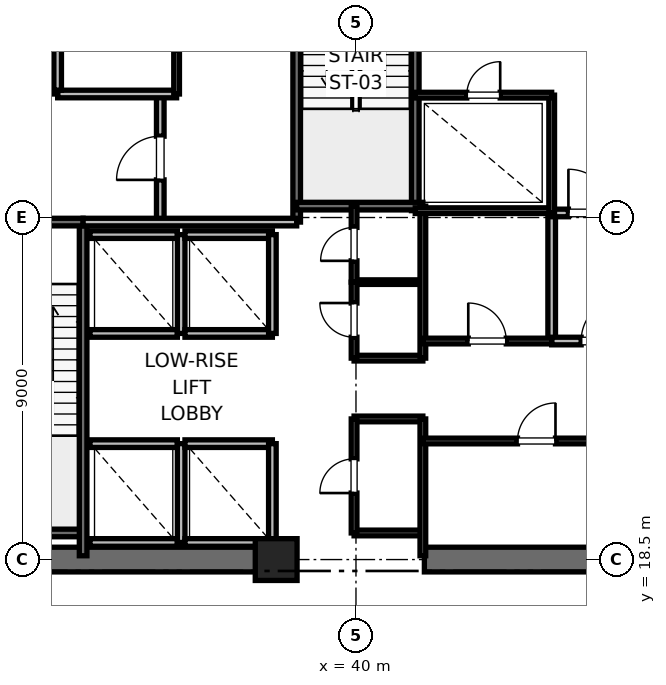
"""IFC4 building model, lengths in metres.
Left out: names, types, materials, properties, quantities, classifications, styles, units other than length and angle.
Written with IfcOpenShell. Run it as: python <this file> out.ifc"""

import sys

from ifc_helpers import new_model, si_unit, direction, frame, frame_2d, origin, origin_2d, place, context, subcontext, project, spatial, rectangle, extrude, element, fill, save


model = new_model("IFC4")
c1 = context("Model", 3, precision=1e-05, world=origin(), true_north=direction((0.0, 1.0)))
c2 = subcontext(c1, "Body", "Model", "MODEL_VIEW")
j1 = project(units=[si_unit("LENGTHUNIT", "METRE"), si_unit("PLANEANGLEUNIT", "RADIAN")], contexts=[c1])
p1 = place(None, origin())
s1 = spatial("IfcSite", under=j1, at=p1, CompositionType="ELEMENT")
p2 = place(p1, origin())
s2 = spatial("IfcBuilding", under=s1, at=p2, CompositionType="ELEMENT")
p3 = place(p2, frame((0.0, 0.0, 16.4)))
s3 = spatial("IfcBuildingStorey", under=s2, at=p3, CompositionType="ELEMENT", Elevation=16.4)
p4 = place(p3, frame((37.9, 18.5, 0.0), z_axis=(0.0, 0.0, 1.0), x_axis=(1.0, 0.0, 0.0)))
e1 = element("IfcColumn", 1, at=p4, inside=s3, PredefinedType="PILASTER", context=c2, shape_type="SweptSolid", body=[
    extrude(rectangle(XDim=1.1, YDim=1.1, at=origin_2d()), origin(), (0.0, 0.0, 1.0), 5.2),
])
for number, where, z_axis, x_axis in (
    (2, (29.0, 18.5, 0.0), (0.0, 0.0, 1.0), (1.0, 0.0, 0.0)),
    (3, (41.8, 18.5, 0.0), (0.0, 0.0, 1.0), (1.0, 0.0, 0.0)),
):
    element("IfcWall", number, at=place(p3, frame(where, z_axis=z_axis, x_axis=x_axis)), inside=s3, PredefinedType="SHEAR", context=c2, shape_type="SweptSolid", body=[
        extrude(rectangle(XDim=9.2, YDim=0.65, at=frame_2d((4.6, 0.0))), origin(), (0.0, 0.0, 1.0), 4.9),
    ])
p5 = place(p3, frame((29.7, 19.2, 0.0), z_axis=(0.0, 0.0, 1.0), x_axis=(1.0, 0.0, 0.0)))
e4 = element("IfcWall", 4, at=p5, inside=s3, PredefinedType="SOLIDWALL", context=c2, shape_type="SweptSolid", body=[
    extrude(rectangle(XDim=3.12, YDim=0.2, at=frame_2d((1.56, 0.0))), origin(), (0.0, 0.0, 1.0), 4.9),
])
p6 = place(p3, frame((32.82, 18.6, 0.0), z_axis=(0.0, 0.0, 1.0), x_axis=(0.0, 1.0, 0.0)))
e5 = element("IfcWall", 5, at=p6, inside=s3, PredefinedType="SOLIDWALL", context=c2, shape_type="SweptSolid", body=[
    extrude(rectangle(XDim=8.78, YDim=0.2, at=frame_2d((4.39, 0.0))), origin(), (0.0, 0.0, 1.0), 4.9),
])
p7 = place(p3, frame((29.7, 27.38, 0.0), z_axis=(0.0, 0.0, 1.0), x_axis=(1.0, 0.0, 0.0)))
e6 = element("IfcWall", 6, at=p7, inside=s3, PredefinedType="SOLIDWALL", context=c2, shape_type="SweptSolid", body=[
    extrude(rectangle(XDim=3.12, YDim=0.2, at=frame_2d((1.56, 0.0))), origin(), (0.0, 0.0, 1.0), 4.9),
])
p8 = place(p7, frame((1.01, 0.0, 0.0)))
e7 = element("IfcOpeningElement", 7, at=p8, cuts=e6, PredefinedType="OPENING", context=c2, shape_type="SweptSolid", body=[
    extrude(rectangle(XDim=1.1, YDim=2.15, at=frame_2d((0.55, 1.075))), frame((0.0, 0.1, 0.0), z_axis=(0.0, -1.0, 0.0), x_axis=(1.0, 0.0, 0.0)), (0.0, 0.0, 1.0), 0.2),
])
p9 = place(p3, frame((38.44, 27.38, 0.0), z_axis=(0.0, 0.0, 1.0), x_axis=(0.0, 1.0, 0.0)))
e8 = element("IfcWall", 8, at=p9, inside=s3, PredefinedType="SOLIDWALL", context=c2, shape_type="SweptSolid", body=[
    extrude(rectangle(XDim=8.87, YDim=0.2, at=frame_2d((4.435, 0.0))), origin(), (0.0, 0.0, 1.0), 4.9),
])
p10 = place(p3, frame((41.56, 27.68, 0.0), z_axis=(0.0, 0.0, 1.0), x_axis=(0.0, 1.0, 0.0)))
e9 = element("IfcWall", 9, at=p10, inside=s3, PredefinedType="SOLIDWALL", context=c2, shape_type="SweptSolid", body=[
    extrude(rectangle(XDim=8.57, YDim=0.2, at=frame_2d((4.285, 0.0))), origin(), (0.0, 0.0, 1.0), 4.9),
])
p11 = place(p3, frame((38.44, 27.8, 0.0), z_axis=(0.0, 0.0, 1.0), x_axis=(1.0, 0.0, 0.0)))
e10 = element("IfcWall", 10, at=p11, inside=s3, PredefinedType="SOLIDWALL", context=c2, shape_type="SweptSolid", body=[
    extrude(rectangle(XDim=3.32, YDim=0.2, at=frame_2d((1.66, 0.0))), origin(), (0.0, 0.0, 1.0), 4.9),
])
p12 = place(p3, frame((34.85, 27.38, 0.0), z_axis=(0.0, 0.0, 1.0), x_axis=(0.0, 1.0, 0.0)))
e11 = element("IfcWall", 11, at=p12, inside=s3, PredefinedType="PARTITIONING", context=c2, shape_type="SweptSolid", body=[
    extrude(rectangle(XDim=3.37, YDim=0.2, at=frame_2d((1.685, 0.0))), origin(), (0.0, 0.0, 1.0), 4.9),
])
p13 = place(p12, frame((1.11, 0.0, 0.0)))
e12 = element("IfcOpeningElement", 12, at=p13, cuts=e11, PredefinedType="OPENING", context=c2, shape_type="SweptSolid", body=[
    extrude(rectangle(XDim=1.15, YDim=2.2, at=frame_2d((0.575, 1.1))), frame((0.0, 0.1, 0.0), z_axis=(0.0, -1.0, 0.0), x_axis=(1.0, 0.0, 0.0)), (0.0, 0.0, 1.0), 0.2),
])
p14 = place(p3, frame((32.82, 27.38, 0.0), z_axis=(0.0, 0.0, 1.0), x_axis=(1.0, 0.0, 0.0)))
e13 = element("IfcWall", 13, at=p14, inside=s3, PredefinedType="PARTITIONING", context=c2, shape_type="SweptSolid", body=[
    extrude(rectangle(XDim=5.62, YDim=0.2, at=frame_2d((2.81, 0.0))), origin(), (0.0, 0.0, 1.0), 4.9),
])
p15 = place(p3, frame((32.15, 30.75, 0.0), z_axis=(0.0, 0.0, 1.0), x_axis=(1.0, 0.0, 0.0)))
e14 = element("IfcWall", 14, at=p15, inside=s3, PredefinedType="PARTITIONING", context=c2, shape_type="SweptSolid", body=[
    extrude(rectangle(XDim=3.13, YDim=0.2, at=frame_2d((1.565, 0.0))), origin(), (0.0, 0.0, 1.0), 4.9),
])
p16 = place(p3, frame((45.15, 24.25, 0.0), z_axis=(0.0, 0.0, 1.0), x_axis=(0.0, 1.0, 0.0)))
e15 = element("IfcWall", 15, at=p16, inside=s3, PredefinedType="PARTITIONING", context=c2, shape_type="SweptSolid", body=[
    extrude(rectangle(XDim=3.37, YDim=0.2, at=frame_2d((1.685, 0.0))), origin(), (0.0, 0.0, 1.0), 4.9),
])
p17 = place(p3, frame((45.15, 24.25, 0.0), z_axis=(0.0, 0.0, 1.0), x_axis=(1.0, 0.0, 0.0)))
e16 = element("IfcWall", 16, at=p17, inside=s3, PredefinedType="PARTITIONING", context=c2, shape_type="SweptSolid", body=[
    extrude(rectangle(XDim=2.7, YDim=0.2, at=frame_2d((1.35, 0.0))), origin(), (0.0, 0.0, 1.0), 4.9),
])
p18 = place(p17, frame((0.775, 0.0, 0.0)))
e17 = element("IfcOpeningElement", 17, at=p18, cuts=e16, PredefinedType="OPENING", context=c2, shape_type="SweptSolid", body=[
    extrude(rectangle(XDim=1.15, YDim=2.2, at=frame_2d((0.575, 1.1))), frame((0.0, 0.1, 0.0), z_axis=(0.0, -1.0, 0.0), x_axis=(1.0, 0.0, 0.0)), (0.0, 0.0, 1.0), 0.2),
])
p19 = place(p3, frame((45.15, 27.62, 0.0), z_axis=(0.0, 0.0, 1.0), x_axis=(1.0, 0.0, 0.0)))
e18 = element("IfcWall", 18, at=p19, inside=s3, PredefinedType="PARTITIONING", context=c2, shape_type="SweptSolid", body=[
    extrude(rectangle(XDim=2.03, YDim=0.2, at=frame_2d((1.015, 0.0))), origin(), (0.0, 0.0, 1.0), 4.9),
])
p20 = place(p19, frame((0.44, 0.0, 0.0)))
e19 = element("IfcOpeningElement", 19, at=p20, cuts=e18, PredefinedType="OPENING", context=c2, shape_type="SweptSolid", body=[
    extrude(rectangle(XDim=1.15, YDim=2.2, at=frame_2d((0.575, 1.1))), frame((0.0, 0.1, 0.0), z_axis=(0.0, -1.0, 0.0), x_axis=(1.0, 0.0, 0.0)), (0.0, 0.0, 1.0), 0.2),
])
p21 = place(p3, frame((29.55, 30.85, 0.0), z_axis=(0.0, 0.0, 1.0), x_axis=(1.0, 0.0, 0.0)))
e20 = element("IfcWall", 20, at=p21, inside=s3, PredefinedType="SOLIDWALL", context=c2, shape_type="SweptSolid", body=[
    extrude(rectangle(XDim=2.6, YDim=0.2, at=frame_2d((1.3, 0.0))), origin(), (0.0, 0.0, 1.0), 3.68),
])
p22 = place(p21, frame((0.75, 0.0, 0.0)))
e21 = element("IfcOpeningElement", 21, at=p22, cuts=e20, PredefinedType="OPENING", context=c2, shape_type="SweptSolid", body=[
    extrude(rectangle(XDim=1.1, YDim=2.2, at=frame_2d((0.55, 1.1))), frame((0.0, 0.1, 0.0), z_axis=(0.0, -1.0, 0.0), x_axis=(1.0, 0.0, 0.0)), (0.0, 0.0, 1.0), 0.2),
])
p23 = place(p3, frame((32.15, 30.85, 0.0), z_axis=(0.0, 0.0, 1.0), x_axis=(0.0, 1.0, 0.0)))
e22 = element("IfcWall", 22, at=p23, inside=s3, PredefinedType="SOLIDWALL", context=c2, shape_type="SweptSolid", body=[
    extrude(rectangle(XDim=3.0, YDim=0.2, at=frame_2d((1.5, 0.0))), origin(), (0.0, 0.0, 1.0), 4.9),
])
for number, where, z_axis, x_axis in (
    (23, (33.0, 18.95, 0.0), (0.0, 0.0, 1.0), (1.0, 0.0, 0.0)),
    (24, (35.3, 21.55, 0.0), (0.0, 0.0, 1.0), (-1.0, 0.0, 0.0)),
):
    element("IfcWall", number, at=place(p3, frame(where, z_axis=z_axis, x_axis=x_axis)), inside=s3, PredefinedType="SOLIDWALL", context=c2, shape_type="SweptSolid", body=[
        extrude(rectangle(XDim=2.3, YDim=0.2, at=frame_2d((1.15, 0.0))), origin(), (0.0, 0.0, 1.0), 4.9),
    ])
p24 = place(p3, frame((35.4, 18.95, 0.0), z_axis=(0.0, 0.0, 1.0), x_axis=(0.0, 1.0, 0.0)))
e25 = element("IfcWall", 25, at=p24, inside=s3, PredefinedType="SOLIDWALL", context=c2, shape_type="SweptSolid", body=[
    extrude(rectangle(XDim=2.6, YDim=0.2, at=frame_2d((1.3, 0.0))), origin(), (0.0, 0.0, 1.0), 4.9),
])
p25 = place(p3, frame((35.5, 18.95, 0.0), z_axis=(0.0, 0.0, 1.0), x_axis=(1.0, 0.0, 0.0)))
e26 = element("IfcWall", 26, at=p25, inside=s3, PredefinedType="SOLIDWALL", context=c2, shape_type="SweptSolid", body=[
    extrude(rectangle(XDim=2.3, YDim=0.2, at=frame_2d((1.15, 0.0))), origin(), (0.0, 0.0, 1.0), 3.68),
])
p26 = place(p3, frame((37.8, 21.55, 0.0), z_axis=(0.0, 0.0, 1.0), x_axis=(-1.0, 0.0, 0.0)))
e27 = element("IfcWall", 27, at=p26, inside=s3, PredefinedType="SOLIDWALL", context=c2, shape_type="SweptSolid", body=[
    extrude(rectangle(XDim=2.3, YDim=0.2, at=frame_2d((1.15, 0.0))), origin(), (0.0, 0.0, 1.0), 4.9),
])
p27 = place(p3, frame((37.8, 18.95, 0.0), z_axis=(0.0, 0.0, 1.0), x_axis=(0.0, 1.0, 0.0)))
e28 = element("IfcWall", 28, at=p27, inside=s3, PredefinedType="SOLIDWALL", context=c2, shape_type="SweptSolid", body=[
    extrude(rectangle(XDim=2.6, YDim=0.2, at=frame_2d((1.3, 0.0))), origin(), (0.0, 0.0, 1.0), 3.68),
])
for number, where, z_axis, x_axis in (
    (29, (33.0, 24.45, 0.0), (0.0, 0.0, 1.0), (1.0, 0.0, 0.0)),
    (30, (35.3, 27.05, 0.0), (0.0, 0.0, 1.0), (-1.0, 0.0, 0.0)),
):
    element("IfcWall", number, at=place(p3, frame(where, z_axis=z_axis, x_axis=x_axis)), inside=s3, PredefinedType="SOLIDWALL", context=c2, shape_type="SweptSolid", body=[
        extrude(rectangle(XDim=2.3, YDim=0.2, at=frame_2d((1.15, 0.0))), origin(), (0.0, 0.0, 1.0), 4.9),
    ])
p28 = place(p3, frame((35.4, 24.45, 0.0), z_axis=(0.0, 0.0, 1.0), x_axis=(0.0, 1.0, 0.0)))
e31 = element("IfcWall", 31, at=p28, inside=s3, PredefinedType="SOLIDWALL", context=c2, shape_type="SweptSolid", body=[
    extrude(rectangle(XDim=2.6, YDim=0.2, at=frame_2d((1.3, 0.0))), origin(), (0.0, 0.0, 1.0), 4.9),
])
for number, where, z_axis, x_axis in (
    (32, (35.5, 24.45, 0.0), (0.0, 0.0, 1.0), (1.0, 0.0, 0.0)),
    (33, (37.8, 27.05, 0.0), (0.0, 0.0, 1.0), (-1.0, 0.0, 0.0)),
):
    element("IfcWall", number, at=place(p3, frame(where, z_axis=z_axis, x_axis=x_axis)), inside=s3, PredefinedType="SOLIDWALL", context=c2, shape_type="SweptSolid", body=[
        extrude(rectangle(XDim=2.3, YDim=0.2, at=frame_2d((1.15, 0.0))), origin(), (0.0, 0.0, 1.0), 4.9),
    ])
p29 = place(p3, frame((37.8, 24.45, 0.0), z_axis=(0.0, 0.0, 1.0), x_axis=(0.0, 1.0, 0.0)))
e34 = element("IfcWall", 34, at=p29, inside=s3, PredefinedType="SOLIDWALL", context=c2, shape_type="SweptSolid", body=[
    extrude(rectangle(XDim=2.6, YDim=0.2, at=frame_2d((1.3, 0.0))), origin(), (0.0, 0.0, 1.0), 4.9),
])
for number, where, z_axis, x_axis in (
    (35, (39.95, 19.2, 0.0), (0.0, 0.0, 1.0), (1.0, 0.0, 0.0)),
    (36, (39.95, 22.2, 0.0), (0.0, 0.0, 1.0), (1.0, 0.0, 0.0)),
    (37, (39.95, 23.8, 0.0), (0.0, 0.0, 1.0), (1.0, 0.0, 0.0)),
):
    element("IfcWall", number, at=place(p3, frame(where, z_axis=z_axis, x_axis=x_axis)), inside=s3, PredefinedType="PARTITIONING", context=c2, shape_type="SweptSolid", body=[
        extrude(rectangle(XDim=1.81, YDim=0.15, at=frame_2d((0.905, 0.0))), origin(), (0.0, 0.0, 1.0), 2.85),
    ])
p30 = place(p3, frame((39.95, 25.8, 0.0), z_axis=(0.0, 0.0, 1.0), x_axis=(1.0, 0.0, 0.0)))
e38 = element("IfcWall", 38, at=p30, inside=s3, PredefinedType="PARTITIONING", context=c2, shape_type="SweptSolid", body=[
    extrude(rectangle(XDim=1.81, YDim=0.12, at=frame_2d((0.905, 0.0))), origin(), (0.0, 0.0, 1.0), 2.85),
])
p31 = place(p3, frame((41.76, 18.6, 0.0), z_axis=(0.0, 0.0, 1.0), x_axis=(0.0, 1.0, 0.0)))
e39 = element("IfcWall", 39, at=p31, inside=s3, PredefinedType="PARTITIONING", context=c2, shape_type="SweptSolid", body=[
    extrude(rectangle(XDim=3.6, YDim=0.15, at=frame_2d((1.8, 0.0))), origin(), (0.0, 0.0, 1.0), 2.85),
])
p32 = place(p3, frame((41.76, 23.8, 0.0), z_axis=(0.0, 0.0, 1.0), x_axis=(0.0, 1.0, 0.0)))
e40 = element("IfcWall", 40, at=p32, inside=s3, PredefinedType="PARTITIONING", context=c2, shape_type="SweptSolid", body=[
    extrude(rectangle(XDim=4.0, YDim=0.15, at=frame_2d((2.0, 0.0))), origin(), (0.0, 0.0, 1.0), 2.85),
])
p33 = place(p3, frame((39.95, 19.2, 0.0), z_axis=(0.0, 0.0, 1.0), x_axis=(0.0, 1.0, 0.0)))
e41 = element("IfcWall", 41, at=p33, inside=s3, PredefinedType="PARTITIONING", context=c2, shape_type="SweptSolid", body=[
    extrude(rectangle(XDim=3.0, YDim=0.15, at=frame_2d((1.5, 0.0))), origin(), (0.0, 0.0, 1.0), 2.85),
])
p34 = place(p33, frame((1.05, 0.0, 0.0)))
e42 = element("IfcOpeningElement", 42, at=p34, cuts=e41, PredefinedType="OPENING", context=c2, shape_type="SweptSolid", body=[
    extrude(rectangle(XDim=0.9, YDim=2.1, at=frame_2d((0.45, 1.05))), frame((0.0, 0.075, 0.0), z_axis=(0.0, -1.0, 0.0), x_axis=(1.0, 0.0, 0.0)), (0.0, 0.0, 1.0), 0.15),
])
p35 = place(p3, frame((39.95, 23.8, 0.0), z_axis=(0.0, 0.0, 1.0), x_axis=(0.0, 1.0, 0.0)))
e43 = element("IfcWall", 43, at=p35, inside=s3, PredefinedType="PARTITIONING", context=c2, shape_type="SweptSolid", body=[
    extrude(rectangle(XDim=2.0, YDim=0.15, at=frame_2d((1.0, 0.0))), origin(), (0.0, 0.0, 1.0), 2.85),
])
p36 = place(p35, frame((0.55, 0.0, 0.0)))
e44 = element("IfcOpeningElement", 44, at=p36, cuts=e43, PredefinedType="OPENING", context=c2, shape_type="SweptSolid", body=[
    extrude(rectangle(XDim=0.9, YDim=2.1, at=frame_2d((0.45, 1.05))), frame((0.0, 0.075, 0.0), z_axis=(0.0, -1.0, 0.0), x_axis=(1.0, 0.0, 0.0)), (0.0, 0.0, 1.0), 0.15),
])
p37 = place(p3, frame((39.95, 25.8, 0.0), z_axis=(0.0, 0.0, 1.0), x_axis=(0.0, 1.0, 0.0)))
e45 = element("IfcWall", 45, at=p37, inside=s3, PredefinedType="PARTITIONING", context=c2, shape_type="SweptSolid", body=[
    extrude(rectangle(XDim=2.0, YDim=0.15, at=frame_2d((1.0, 0.0))), origin(), (0.0, 0.0, 1.0), 2.85),
])
p38 = place(p37, frame((0.56, 0.0, 0.0)))
e46 = element("IfcOpeningElement", 46, at=p38, cuts=e45, PredefinedType="OPENING", context=c2, shape_type="SweptSolid", body=[
    extrude(rectangle(XDim=0.88, YDim=2.1, at=frame_2d((0.44, 1.05))), frame((0.0, 0.075, 0.0), z_axis=(0.0, -1.0, 0.0), x_axis=(1.0, 0.0, 0.0)), (0.0, 0.0, 1.0), 0.15),
])
p39 = place(p3, frame((35.28, 30.75, 0.0), z_axis=(0.0, 0.0, 1.0), x_axis=(0.0, 1.0, 0.0)))
e47 = element("IfcWall", 47, at=p39, inside=s3, PredefinedType="PARTITIONING", context=c2, shape_type="SweptSolid", body=[
    extrude(rectangle(XDim=3.2, YDim=0.15, at=frame_2d((1.6, 0.0))), origin(), (0.0, 0.0, 1.0), 2.85),
])
p40 = place(p39, frame((1.15, 0.0, 0.0)))
e48 = element("IfcOpeningElement", 48, at=p40, cuts=e47, PredefinedType="OPENING", context=c2, shape_type="SweptSolid", body=[
    extrude(rectangle(XDim=0.9, YDim=2.1, at=frame_2d((0.45, 1.05))), frame((0.0, 0.075, 0.0), z_axis=(0.0, -1.0, 0.0), x_axis=(1.0, 0.0, 0.0)), (0.0, 0.0, 1.0), 0.15),
])
p41 = place(p3, frame((41.56, 27.68, 0.0), z_axis=(0.0, 0.0, 1.0), x_axis=(1.0, 0.0, 0.0)))
e49 = element("IfcWall", 49, at=p41, inside=s3, PredefinedType="PARTITIONING", context=c2, shape_type="SweptSolid", body=[
    extrude(rectangle(XDim=3.59, YDim=0.15, at=frame_2d((1.795, 0.0))), origin(), (0.0, 0.0, 1.0), 2.85),
])
p42 = place(p3, frame((41.76, 21.62, 0.0), z_axis=(0.0, 0.0, 1.0), x_axis=(1.0, 0.0, 0.0)))
e50 = element("IfcWall", 50, at=p42, inside=s3, PredefinedType="PARTITIONING", context=c2, shape_type="SweptSolid", body=[
    extrude(rectangle(XDim=5.98, YDim=0.15, at=frame_2d((2.99, 0.0))), origin(), (0.0, 0.0, 1.0), 2.85),
])
p43 = place(p42, frame((2.49, 0.0, 0.0)))
e51 = element("IfcOpeningElement", 51, at=p43, cuts=e50, PredefinedType="OPENING", context=c2, shape_type="SweptSolid", body=[
    extrude(rectangle(XDim=1.0, YDim=2.15, at=frame_2d((0.5, 1.075))), frame((0.0, 0.075, 0.0), z_axis=(0.0, -1.0, 0.0), x_axis=(1.0, 0.0, 0.0)), (0.0, 0.0, 1.0), 0.15),
])
p44 = place(p3, frame((41.76, 24.25, 0.0), z_axis=(0.0, 0.0, 1.0), x_axis=(1.0, 0.0, 0.0)))
e52 = element("IfcWall", 52, at=p44, inside=s3, PredefinedType="PARTITIONING", context=c2, shape_type="SweptSolid", body=[
    extrude(rectangle(XDim=3.39, YDim=0.15, at=frame_2d((1.695, 0.0))), origin(), (0.0, 0.0, 1.0), 2.85),
])
p45 = place(p44, frame((1.195, 0.0, 0.0)))
e53 = element("IfcOpeningElement", 53, at=p45, cuts=e52, PredefinedType="OPENING", context=c2, shape_type="SweptSolid", body=[
    extrude(rectangle(XDim=1.0, YDim=2.15, at=frame_2d((0.5, 1.075))), frame((0.0, 0.075, 0.0), z_axis=(0.0, -1.0, 0.0), x_axis=(1.0, 0.0, 0.0)), (0.0, 0.0, 1.0), 0.15),
])
p46 = place(p3, frame((45.15, 27.62, 0.0), z_axis=(0.0, 0.0, 1.0), x_axis=(0.0, 1.0, 0.0)))
e54 = element("IfcWall", 54, at=p46, inside=s3, PredefinedType="PARTITIONING", context=c2, shape_type="SweptSolid", body=[
    extrude(rectangle(XDim=3.1, YDim=0.15, at=frame_2d((1.55, 0.0))), origin(), (0.0, 0.0, 1.0), 2.85),
])
p47 = place(p3, frame((41.56, 30.72, 0.0), z_axis=(0.0, 0.0, 1.0), x_axis=(1.0, 0.0, 0.0)))
e55 = element("IfcWall", 55, at=p47, inside=s3, PredefinedType="PARTITIONING", context=c2, shape_type="SweptSolid", body=[
    extrude(rectangle(XDim=3.59, YDim=0.15, at=frame_2d((1.795, 0.0))), origin(), (0.0, 0.0, 1.0), 2.85),
])
p48 = place(p47, frame((1.355, 0.0, 0.0)))
e56 = element("IfcOpeningElement", 56, at=p48, cuts=e55, PredefinedType="OPENING", context=c2, shape_type="SweptSolid", body=[
    extrude(rectangle(XDim=0.88, YDim=2.1, at=frame_2d((0.44, 1.05))), frame((0.0, 0.075, 0.0), z_axis=(0.0, -1.0, 0.0), x_axis=(1.0, 0.0, 0.0)), (0.0, 0.0, 1.0), 0.15),
])
p49 = place(p13, origin())
e57 = element("IfcDoor", 57, at=p49, inside=s3, OperationType="SINGLE_SWING_LEFT", PredefinedType="DOOR", context=c2, shape_type="SweptSolid", body=[
    extrude(rectangle(XDim=1.15, YDim=2.2, at=frame_2d((0.575, 1.1))), frame((0.0, 0.025, 0.0), z_axis=(0.0, -1.0, 0.0), x_axis=(1.0, 0.0, 0.0)), (0.0, 0.0, 1.0), 0.05),
])
fill(e12, e57)
p50 = place(p18, origin())
e58 = element("IfcDoor", 58, at=p50, inside=s3, OperationType="SINGLE_SWING_RIGHT", PredefinedType="DOOR", context=c2, shape_type="SweptSolid", body=[
    extrude(rectangle(XDim=1.15, YDim=2.2, at=frame_2d((0.575, 1.1))), frame((0.0, 0.025, 0.0), z_axis=(0.0, -1.0, 0.0), x_axis=(1.0, 0.0, 0.0)), (0.0, 0.0, 1.0), 0.05),
])
fill(e17, e58)
p51 = place(p20, origin())
e59 = element("IfcDoor", 59, at=p51, inside=s3, OperationType="SINGLE_SWING_LEFT", PredefinedType="DOOR", context=c2, shape_type="SweptSolid", body=[
    extrude(rectangle(XDim=1.15, YDim=2.2, at=frame_2d((0.575, 1.1))), frame((0.0, 0.025, 0.0), z_axis=(0.0, -1.0, 0.0), x_axis=(1.0, 0.0, 0.0)), (0.0, 0.0, 1.0), 0.05),
])
fill(e19, e59)
p52 = place(p34, origin())
e60 = element("IfcDoor", 60, at=p52, inside=s3, OperationType="SINGLE_SWING_LEFT", PredefinedType="DOOR", context=c2, shape_type="SweptSolid", body=[
    extrude(rectangle(XDim=0.9, YDim=2.1, at=frame_2d((0.45, 1.05))), frame((0.0, 0.025, 0.0), z_axis=(0.0, -1.0, 0.0), x_axis=(1.0, 0.0, 0.0)), (0.0, 0.0, 1.0), 0.05),
])
fill(e42, e60)
p53 = place(p36, origin())
e61 = element("IfcDoor", 61, at=p53, inside=s3, OperationType="SINGLE_SWING_RIGHT", PredefinedType="DOOR", context=c2, shape_type="SweptSolid", body=[
    extrude(rectangle(XDim=0.9, YDim=2.1, at=frame_2d((0.45, 1.05))), frame((0.0, 0.025, 0.0), z_axis=(0.0, -1.0, 0.0), x_axis=(1.0, 0.0, 0.0)), (0.0, 0.0, 1.0), 0.05),
])
fill(e44, e61)
p54 = place(p38, origin())
e62 = element("IfcDoor", 62, at=p54, inside=s3, OperationType="SINGLE_SWING_LEFT", PredefinedType="DOOR", context=c2, shape_type="SweptSolid", body=[
    extrude(rectangle(XDim=0.88, YDim=2.1, at=frame_2d((0.44, 1.05))), frame((0.0, 0.025, 0.0), z_axis=(0.0, -1.0, 0.0), x_axis=(1.0, 0.0, 0.0)), (0.0, 0.0, 1.0), 0.05),
])
fill(e46, e62)
p55 = place(p43, origin())
e63 = element("IfcDoor", 63, at=p55, inside=s3, OperationType="SINGLE_SWING_RIGHT", PredefinedType="DOOR", context=c2, shape_type="SweptSolid", body=[
    extrude(rectangle(XDim=1.0, YDim=2.15, at=frame_2d((0.5, 1.075))), frame((0.0, 0.025, 0.0), z_axis=(0.0, -1.0, 0.0), x_axis=(1.0, 0.0, 0.0)), (0.0, 0.0, 1.0), 0.05),
])
fill(e51, e63)
p56 = place(p45, origin())
e64 = element("IfcDoor", 64, at=p56, inside=s3, OperationType="SINGLE_SWING_LEFT", PredefinedType="DOOR", context=c2, shape_type="SweptSolid", body=[
    extrude(rectangle(XDim=1.0, YDim=2.15, at=frame_2d((0.5, 1.075))), frame((0.0, 0.025, 0.0), z_axis=(0.0, -1.0, 0.0), x_axis=(1.0, 0.0, 0.0)), (0.0, 0.0, 1.0), 0.05),
])
fill(e53, e64)
p57 = place(p48, origin())
e65 = element("IfcDoor", 65, at=p57, inside=s3, OperationType="SINGLE_SWING_RIGHT", PredefinedType="DOOR", context=c2, shape_type="SweptSolid", body=[
    extrude(rectangle(XDim=0.88, YDim=2.1, at=frame_2d((0.44, 1.05))), frame((0.0, 0.025, 0.0), z_axis=(0.0, -1.0, 0.0), x_axis=(1.0, 0.0, 0.0)), (0.0, 0.0, 1.0), 0.05),
])
fill(e56, e65)
save(model, sys.argv[1])
